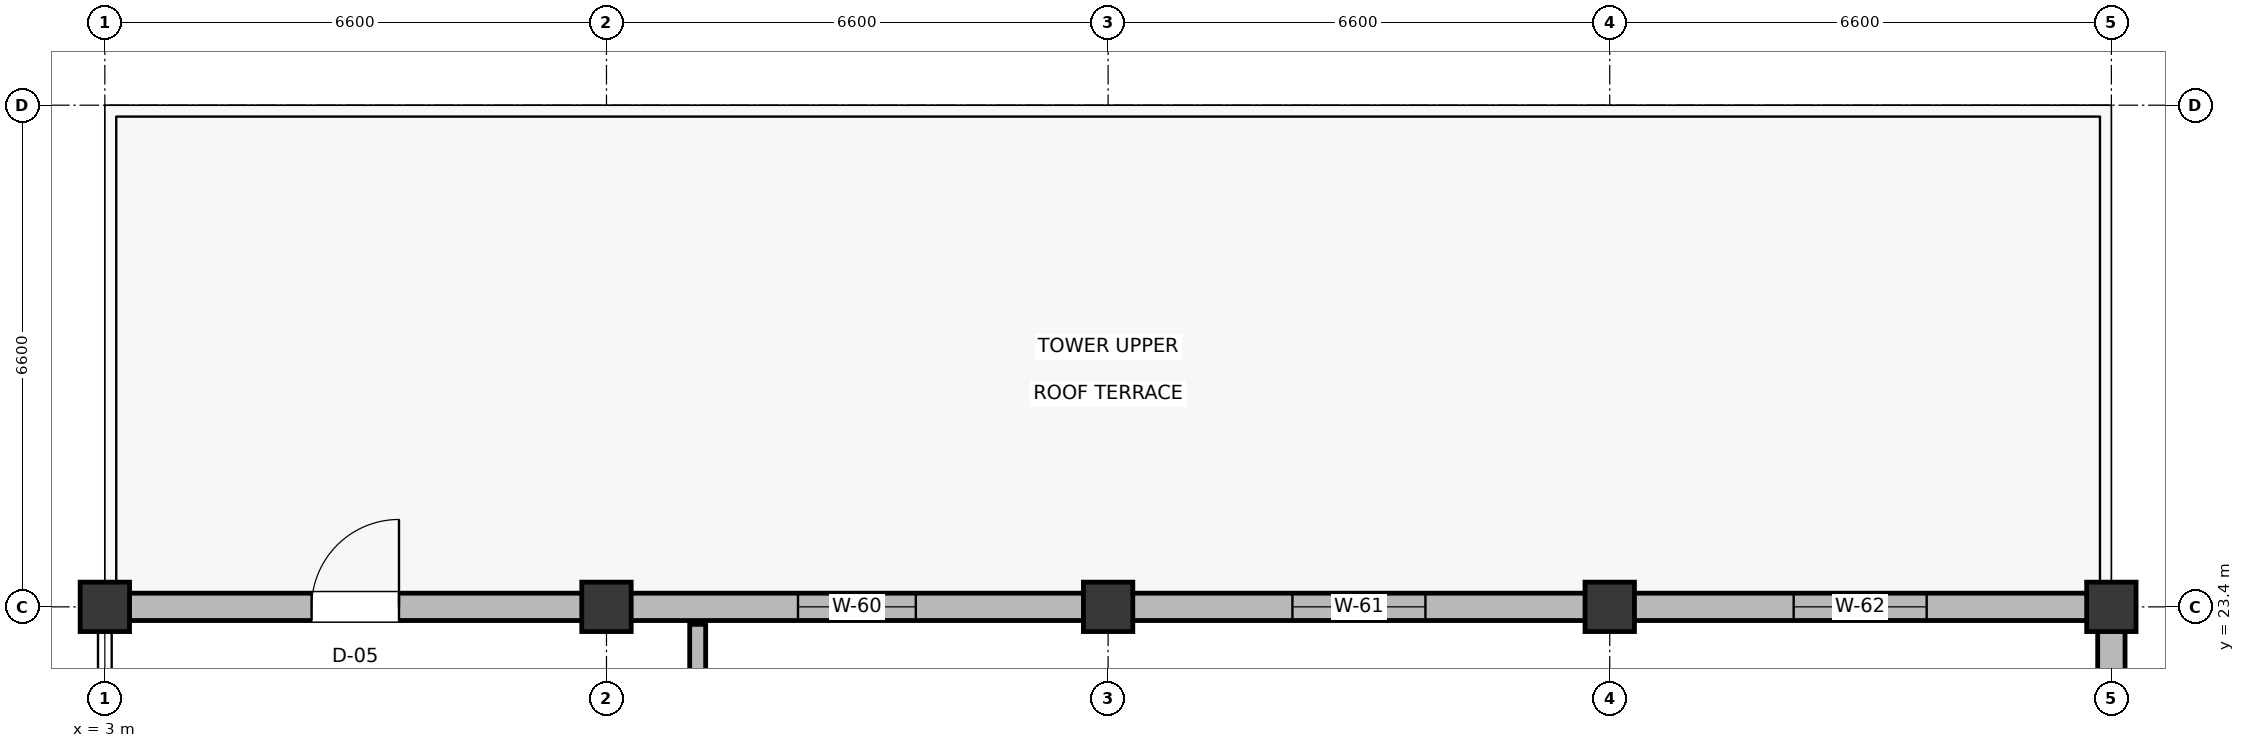
"""IFC4 building model, lengths in metres.
Left out: names, types, materials, properties, quantities, classifications, styles, units other than length and angle.
Written with IfcOpenShell. Run it as: python <this file> out.ifc"""

import sys

from ifc_helpers import new_model, si_unit, direction, frame, frame_2d, origin, origin_2d, place, context, subcontext, project, spatial, rectangle, extrude, element, fill, save


model = new_model("IFC4")
c1 = context("Model", 3, precision=1e-05, world=origin(), true_north=direction((0.0, 1.0)))
c2 = subcontext(c1, "Body", "Model", "MODEL_VIEW")
j1 = project(units=[si_unit("LENGTHUNIT", "METRE"), si_unit("PLANEANGLEUNIT", "RADIAN")], contexts=[c1])
p1 = place(None, origin())
s1 = spatial("IfcSite", under=j1, at=p1, CompositionType="ELEMENT")
p2 = place(p1, origin())
s2 = spatial("IfcBuilding", under=s1, at=p2, CompositionType="ELEMENT")
p3 = place(p2, frame((0.0, 0.0, 36.8)))
s3 = spatial("IfcBuildingStorey", under=s2, at=p3, CompositionType="ELEMENT", Elevation=36.8)
for number, where, z_axis, x_axis in (
    (1, (3.0, 23.4, 0.0), (0.0, 0.0, 1.0), (1.0, 0.0, 0.0)),
    (2, (9.6, 23.4, 0.0), (0.0, 0.0, 1.0), (1.0, 0.0, 0.0)),
    (3, (16.2, 23.4, 0.0), (0.0, 0.0, 1.0), (1.0, 0.0, 0.0)),
    (4, (22.8, 23.4, 0.0), (0.0, 0.0, 1.0), (1.0, 0.0, 0.0)),
    (5, (29.4, 23.4, 0.0), (0.0, 0.0, 1.0), (1.0, 0.0, 0.0)),
):
    element("IfcColumn", number, at=place(p3, frame(where, z_axis=z_axis, x_axis=x_axis)), inside=s3, PredefinedType="COLUMN", context=c2, shape_type="SweptSolid", body=[
        extrude(rectangle(XDim=0.65, YDim=0.65, at=origin_2d()), origin(), (0.0, 0.0, 1.0), 3.8),
    ])
p4 = place(p3, frame((29.4, 9.315, 0.0), z_axis=(0.0, 0.0, 1.0), x_axis=(0.0, 1.0, 0.0)))
e6 = element("IfcWall", 6, at=p4, inside=s3, PredefinedType="SOLIDWALL", context=c2, shape_type="SweptSolid", body=[
    extrude(rectangle(XDim=13.77, YDim=0.36, at=frame_2d((6.885, 0.0))), origin(), (0.0, 0.0, 1.0), 2.725),
])
p5 = place(p4, frame((6.11, 0.0, 0.9)))
e7 = element("IfcOpeningElement", 7, at=p5, cuts=e6, PredefinedType="OPENING", context=c2, shape_type="SweptSolid", body=[
    extrude(rectangle(XDim=1.55, YDim=1.55, at=frame_2d((0.775, 0.775))), frame((0.0, 0.19, 0.0), z_axis=(0.0, -1.0, 0.0), x_axis=(1.0, 0.0, 0.0)), (0.0, 0.0, 1.0), 0.38),
])
p6 = place(p3, frame((3.305, 23.4, 0.0), z_axis=(0.0, 0.0, 1.0), x_axis=(1.0, 0.0, 0.0)))
e8 = element("IfcWall", 8, at=p6, inside=s3, PredefinedType="SOLIDWALL", context=c2, shape_type="SweptSolid", body=[
    extrude(rectangle(XDim=5.98, YDim=0.36, at=frame_2d((2.99, 0.0))), origin(), (0.0, 0.0, 1.0), 2.595),
])
p7 = place(p6, frame((2.415, 0.0, 0.0)))
e9 = element("IfcOpeningElement", 9, at=p7, cuts=e8, PredefinedType="OPENING", context=c2, shape_type="SweptSolid", body=[
    extrude(rectangle(XDim=1.15, YDim=2.2, at=frame_2d((0.575, 1.1))), frame((0.0, 0.19, 0.0), z_axis=(0.0, -1.0, 0.0), x_axis=(1.0, 0.0, 0.0)), (0.0, 0.0, 1.0), 0.38),
])
p8 = place(p3, frame((9.905, 23.4, 0.0), z_axis=(0.0, 0.0, 1.0), x_axis=(1.0, 0.0, 0.0)))
e10 = element("IfcWall", 10, at=p8, inside=s3, PredefinedType="SOLIDWALL", context=c2, shape_type="SweptSolid", body=[
    extrude(rectangle(XDim=5.98, YDim=0.36, at=frame_2d((2.99, 0.0))), origin(), (0.0, 0.0, 1.0), 2.825),
])
p9 = place(p8, frame((2.215, 0.0, 0.9)))
e11 = element("IfcOpeningElement", 11, at=p9, cuts=e10, PredefinedType="OPENING", context=c2, shape_type="SweptSolid", body=[
    extrude(rectangle(XDim=1.55, YDim=1.75, at=frame_2d((0.775, 0.875))), frame((0.0, 0.19, 0.0), z_axis=(0.0, -1.0, 0.0), x_axis=(1.0, 0.0, 0.0)), (0.0, 0.0, 1.0), 0.38),
])
p10 = place(p3, frame((16.505, 23.4, 0.0), z_axis=(0.0, 0.0, 1.0), x_axis=(1.0, 0.0, 0.0)))
e12 = element("IfcWall", 12, at=p10, inside=s3, PredefinedType="SOLIDWALL", context=c2, shape_type="SweptSolid", body=[
    extrude(rectangle(XDim=5.99, YDim=0.36, at=frame_2d((2.995, 0.0))), origin(), (0.0, 0.0, 1.0), 2.615),
])
p11 = place(p10, frame((2.12, 0.0, 0.9)))
e13 = element("IfcOpeningElement", 13, at=p11, cuts=e12, PredefinedType="OPENING", context=c2, shape_type="SweptSolid", body=[
    extrude(rectangle(XDim=1.75, YDim=1.15, at=frame_2d((0.875, 0.575))), frame((0.0, 0.19, 0.0), z_axis=(0.0, -1.0, 0.0), x_axis=(1.0, 0.0, 0.0)), (0.0, 0.0, 1.0), 0.38),
])
p12 = place(p3, frame((23.105, 23.4, 0.0), z_axis=(0.0, 0.0, 1.0), x_axis=(1.0, 0.0, 0.0)))
e14 = element("IfcWall", 14, at=p12, inside=s3, PredefinedType="SOLIDWALL", context=c2, shape_type="SweptSolid", body=[
    extrude(rectangle(XDim=5.98, YDim=0.36, at=frame_2d((2.99, 0.0))), origin(), (0.0, 0.0, 1.0), 2.825),
])
p13 = place(p12, frame((2.115, 0.0, 0.9)))
e15 = element("IfcOpeningElement", 15, at=p13, cuts=e14, PredefinedType="OPENING", context=c2, shape_type="SweptSolid", body=[
    extrude(rectangle(XDim=1.75, YDim=1.35, at=frame_2d((0.875, 0.675))), frame((0.0, 0.19, 0.0), z_axis=(0.0, -1.0, 0.0), x_axis=(1.0, 0.0, 0.0)), (0.0, 0.0, 1.0), 0.38),
])
p14 = place(p3, frame((10.8, 20.48, 0.0), z_axis=(0.0, 0.0, 1.0), x_axis=(0.0, 1.0, 0.0)))
e16 = element("IfcWall", 16, at=p14, inside=s3, PredefinedType="PLUMBINGWALL", context=c2, shape_type="SweptSolid", body=[
    extrude(rectangle(XDim=2.69, YDim=0.21, at=frame_2d((1.345, 0.0))), origin(), (0.0, 0.0, 1.0), 2.825),
])
p15 = place(p14, frame((0.885, 0.0, 0.0)))
e17 = element("IfcOpeningElement", 17, at=p15, cuts=e16, PredefinedType="OPENING", context=c2, shape_type="SweptSolid", body=[
    extrude(rectangle(XDim=0.92, YDim=2.1, at=frame_2d((0.46, 1.05))), frame((0.0, 0.115, 0.0), z_axis=(0.0, -1.0, 0.0), x_axis=(1.0, 0.0, 0.0)), (0.0, 0.0, 1.0), 0.23),
])
p16 = place(p7, origin())
e18 = element("IfcDoor", 18, at=p16, inside=s3, OperationType="SINGLE_SWING_RIGHT", PredefinedType="DOOR", context=c2, shape_type="SweptSolid", body=[
    extrude(rectangle(XDim=1.15, YDim=2.2, at=frame_2d((0.575, 1.1))), frame((0.0, 0.025, 0.0), z_axis=(0.0, -1.0, 0.0), x_axis=(1.0, 0.0, 0.0)), (0.0, 0.0, 1.0), 0.05),
])
fill(e9, e18)
p17 = place(p9, origin())
e19 = element("IfcWindow", 19, at=p17, inside=s3, PartitioningType="DOUBLE_PANEL_VERTICAL", PredefinedType="WINDOW", context=c2, shape_type="SweptSolid", body=[
    extrude(rectangle(XDim=1.55, YDim=1.75, at=frame_2d((0.775, 0.875))), frame((0.0, 0.03, 0.0), z_axis=(0.0, -1.0, 0.0), x_axis=(1.0, 0.0, 0.0)), (0.0, 0.0, 1.0), 0.06),
])
fill(e11, e19)
p18 = place(p11, origin())
e20 = element("IfcWindow", 20, at=p18, inside=s3, PartitioningType="DOUBLE_PANEL_VERTICAL", PredefinedType="WINDOW", context=c2, shape_type="SweptSolid", body=[
    extrude(rectangle(XDim=1.75, YDim=1.15, at=frame_2d((0.875, 0.575))), frame((0.0, 0.03, 0.0), z_axis=(0.0, -1.0, 0.0), x_axis=(1.0, 0.0, 0.0)), (0.0, 0.0, 1.0), 0.06),
])
fill(e13, e20)
p19 = place(p13, origin())
e21 = element("IfcWindow", 21, at=p19, inside=s3, PartitioningType="DOUBLE_PANEL_VERTICAL", PredefinedType="WINDOW", context=c2, shape_type="SweptSolid", body=[
    extrude(rectangle(XDim=1.75, YDim=1.35, at=frame_2d((0.875, 0.675))), frame((0.0, 0.03, 0.0), z_axis=(0.0, -1.0, 0.0), x_axis=(1.0, 0.0, 0.0)), (0.0, 0.0, 1.0), 0.06),
])
fill(e15, e21)
save(model, sys.argv[1])
